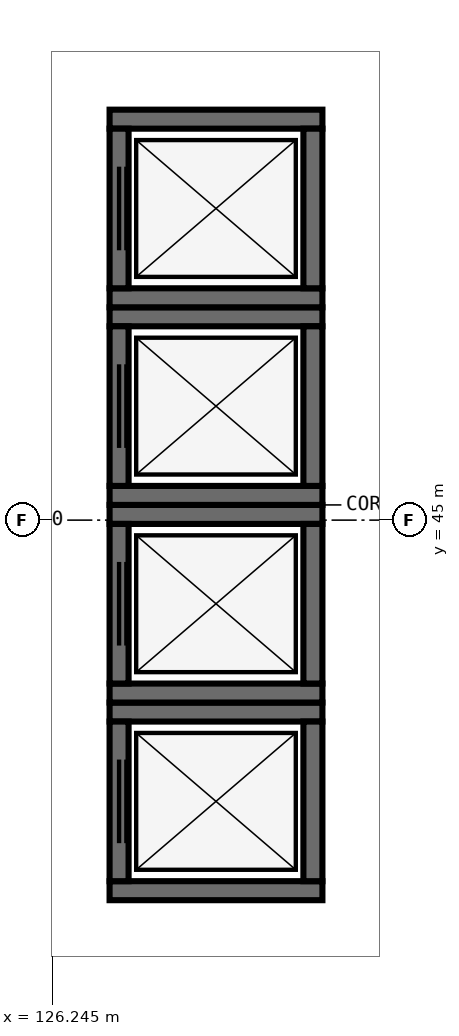
"""IFC4 building model, lengths in metres.
Left out: names, types, materials, properties, quantities, classifications, styles, units other than length and angle.
Written with IfcOpenShell. Run it as: python <this file> out.ifc"""

import sys

from ifc_helpers import new_model, si_unit, direction, frame, frame_2d, origin, place, context, subcontext, project, spatial, rectangle, extrude, element, fill, save


model = new_model("IFC4")
c1 = context("Model", 3, precision=1e-05, world=origin(), true_north=direction((0.0, 1.0)))
c2 = subcontext(c1, "Body", "Model", "MODEL_VIEW")
j1 = project(units=[si_unit("LENGTHUNIT", "METRE"), si_unit("PLANEANGLEUNIT", "RADIAN")], contexts=[c1])
p1 = place(None, origin())
s1 = spatial("IfcSite", under=j1, at=p1, CompositionType="ELEMENT")
p2 = place(p1, origin())
s2 = spatial("IfcBuilding", under=s1, at=p2, CompositionType="ELEMENT")
p3 = place(p2, frame((0.0, 0.0, 12.0)))
s3 = spatial("IfcBuildingStorey", under=s2, at=p3, CompositionType="ELEMENT", Elevation=12.0)
for number, where, z_axis, x_axis in (
    (1, (127.0, 40.125, 0.0), (0.0, 0.0, 1.0), (1.0, 0.0, 0.0)),
    (2, (129.8, 42.475, 0.0), (0.0, 0.0, 1.0), (-1.0, 0.0, 0.0)),
):
    element("IfcWall", number, at=place(p3, frame(where, z_axis=z_axis, x_axis=x_axis)), inside=s3, PredefinedType="SHEAR", context=c2, shape_type="SweptSolid", body=[
        extrude(rectangle(XDim=2.8, YDim=0.25, at=frame_2d((1.4, 0.0))), origin(), (0.0, 0.0, 1.0), 6.0),
    ])
p4 = place(p3, frame((127.125, 42.35, 0.0), z_axis=(0.0, 0.0, 1.0), x_axis=(0.0, -1.0, 0.0)))
e3 = element("IfcWall", 3, at=p4, inside=s3, PredefinedType="SHEAR", context=c2, shape_type="SweptSolid", body=[
    extrude(rectangle(XDim=2.1, YDim=0.25, at=frame_2d((1.05, 0.0))), origin(), (0.0, 0.0, 1.0), 6.0),
])
p5 = place(p4, frame((0.5, 0.0, 0.0)))
e4 = element("IfcOpeningElement", 4, at=p5, cuts=e3, PredefinedType="OPENING", context=c2, shape_type="SweptSolid", body=[
    extrude(rectangle(XDim=1.1, YDim=2.2, at=frame_2d((0.55, 1.1))), frame((0.0, 0.14, 0.0), z_axis=(0.0, -1.0, 0.0), x_axis=(1.0, 0.0, 0.0)), (0.0, 0.0, 1.0), 0.28),
])
p6 = place(p3, frame((129.675, 40.25, 0.0), z_axis=(0.0, 0.0, 1.0), x_axis=(0.0, 1.0, 0.0)))
e5 = element("IfcWall", 5, at=p6, inside=s3, PredefinedType="SHEAR", context=c2, shape_type="SweptSolid", body=[
    extrude(rectangle(XDim=2.1, YDim=0.25, at=frame_2d((1.05, 0.0))), origin(), (0.0, 0.0, 1.0), 6.0),
])
for number, where, z_axis, x_axis in (
    (6, (127.0, 42.725, 0.0), (0.0, 0.0, 1.0), (1.0, 0.0, 0.0)),
    (7, (129.8, 45.075, 0.0), (0.0, 0.0, 1.0), (-1.0, 0.0, 0.0)),
):
    element("IfcWall", number, at=place(p3, frame(where, z_axis=z_axis, x_axis=x_axis)), inside=s3, PredefinedType="SHEAR", context=c2, shape_type="SweptSolid", body=[
        extrude(rectangle(XDim=2.8, YDim=0.25, at=frame_2d((1.4, 0.0))), origin(), (0.0, 0.0, 1.0), 6.0),
    ])
p7 = place(p3, frame((127.125, 44.95, 0.0), z_axis=(0.0, 0.0, 1.0), x_axis=(0.0, -1.0, 0.0)))
e8 = element("IfcWall", 8, at=p7, inside=s3, PredefinedType="SHEAR", context=c2, shape_type="SweptSolid", body=[
    extrude(rectangle(XDim=2.1, YDim=0.25, at=frame_2d((1.05, 0.0))), origin(), (0.0, 0.0, 1.0), 6.0),
])
p8 = place(p7, frame((0.5, 0.0, 0.0)))
e9 = element("IfcOpeningElement", 9, at=p8, cuts=e8, PredefinedType="OPENING", context=c2, shape_type="SweptSolid", body=[
    extrude(rectangle(XDim=1.1, YDim=2.2, at=frame_2d((0.55, 1.1))), frame((0.0, 0.14, 0.0), z_axis=(0.0, -1.0, 0.0), x_axis=(1.0, 0.0, 0.0)), (0.0, 0.0, 1.0), 0.28),
])
p9 = place(p3, frame((129.675, 42.85, 0.0), z_axis=(0.0, 0.0, 1.0), x_axis=(0.0, 1.0, 0.0)))
e10 = element("IfcWall", 10, at=p9, inside=s3, PredefinedType="SHEAR", context=c2, shape_type="SweptSolid", body=[
    extrude(rectangle(XDim=2.1, YDim=0.25, at=frame_2d((1.05, 0.0))), origin(), (0.0, 0.0, 1.0), 6.0),
])
for number, where, z_axis, x_axis in (
    (11, (127.0, 45.325, 0.0), (0.0, 0.0, 1.0), (1.0, 0.0, 0.0)),
    (12, (129.8, 47.675, 0.0), (0.0, 0.0, 1.0), (-1.0, 0.0, 0.0)),
):
    element("IfcWall", number, at=place(p3, frame(where, z_axis=z_axis, x_axis=x_axis)), inside=s3, PredefinedType="SHEAR", context=c2, shape_type="SweptSolid", body=[
        extrude(rectangle(XDim=2.8, YDim=0.25, at=frame_2d((1.4, 0.0))), origin(), (0.0, 0.0, 1.0), 6.0),
    ])
p10 = place(p3, frame((127.125, 47.55, 0.0), z_axis=(0.0, 0.0, 1.0), x_axis=(0.0, -1.0, 0.0)))
e13 = element("IfcWall", 13, at=p10, inside=s3, PredefinedType="SHEAR", context=c2, shape_type="SweptSolid", body=[
    extrude(rectangle(XDim=2.1, YDim=0.25, at=frame_2d((1.05, 0.0))), origin(), (0.0, 0.0, 1.0), 6.0),
])
p11 = place(p10, frame((0.5, 0.0, 0.0)))
e14 = element("IfcOpeningElement", 14, at=p11, cuts=e13, PredefinedType="OPENING", context=c2, shape_type="SweptSolid", body=[
    extrude(rectangle(XDim=1.1, YDim=2.2, at=frame_2d((0.55, 1.1))), frame((0.0, 0.14, 0.0), z_axis=(0.0, -1.0, 0.0), x_axis=(1.0, 0.0, 0.0)), (0.0, 0.0, 1.0), 0.28),
])
p12 = place(p3, frame((129.675, 45.45, 0.0), z_axis=(0.0, 0.0, 1.0), x_axis=(0.0, 1.0, 0.0)))
e15 = element("IfcWall", 15, at=p12, inside=s3, PredefinedType="SHEAR", context=c2, shape_type="SweptSolid", body=[
    extrude(rectangle(XDim=2.1, YDim=0.25, at=frame_2d((1.05, 0.0))), origin(), (0.0, 0.0, 1.0), 6.0),
])
for number, where, z_axis, x_axis in (
    (16, (127.0, 47.925, 0.0), (0.0, 0.0, 1.0), (1.0, 0.0, 0.0)),
    (17, (129.8, 50.275, 0.0), (0.0, 0.0, 1.0), (-1.0, 0.0, 0.0)),
):
    element("IfcWall", number, at=place(p3, frame(where, z_axis=z_axis, x_axis=x_axis)), inside=s3, PredefinedType="SHEAR", context=c2, shape_type="SweptSolid", body=[
        extrude(rectangle(XDim=2.8, YDim=0.25, at=frame_2d((1.4, 0.0))), origin(), (0.0, 0.0, 1.0), 6.0),
    ])
p13 = place(p3, frame((127.125, 50.15, 0.0), z_axis=(0.0, 0.0, 1.0), x_axis=(0.0, -1.0, 0.0)))
e18 = element("IfcWall", 18, at=p13, inside=s3, PredefinedType="SHEAR", context=c2, shape_type="SweptSolid", body=[
    extrude(rectangle(XDim=2.1, YDim=0.25, at=frame_2d((1.05, 0.0))), origin(), (0.0, 0.0, 1.0), 6.0),
])
p14 = place(p13, frame((0.5, 0.0, 0.0)))
e19 = element("IfcOpeningElement", 19, at=p14, cuts=e18, PredefinedType="OPENING", context=c2, shape_type="SweptSolid", body=[
    extrude(rectangle(XDim=1.1, YDim=2.2, at=frame_2d((0.55, 1.1))), frame((0.0, 0.14, 0.0), z_axis=(0.0, -1.0, 0.0), x_axis=(1.0, 0.0, 0.0)), (0.0, 0.0, 1.0), 0.28),
])
p15 = place(p3, frame((129.675, 48.05, 0.0), z_axis=(0.0, 0.0, 1.0), x_axis=(0.0, 1.0, 0.0)))
e20 = element("IfcWall", 20, at=p15, inside=s3, PredefinedType="SHEAR", context=c2, shape_type="SweptSolid", body=[
    extrude(rectangle(XDim=2.1, YDim=0.25, at=frame_2d((1.05, 0.0))), origin(), (0.0, 0.0, 1.0), 6.0),
])
p16 = place(p5, origin())
e21 = element("IfcDoor", 21, at=p16, inside=s3, OperationType="DOUBLE_DOOR_SLIDING", PredefinedType="DOOR", context=c2, shape_type="SweptSolid", body=[
    extrude(rectangle(XDim=1.1, YDim=2.2, at=frame_2d((0.55, 1.1))), frame((0.0, 0.025, 0.0), z_axis=(0.0, -1.0, 0.0), x_axis=(1.0, 0.0, 0.0)), (0.0, 0.0, 1.0), 0.05),
])
fill(e4, e21)
p17 = place(p8, origin())
e22 = element("IfcDoor", 22, at=p17, inside=s3, OperationType="DOUBLE_DOOR_SLIDING", PredefinedType="DOOR", context=c2, shape_type="SweptSolid", body=[
    extrude(rectangle(XDim=1.1, YDim=2.2, at=frame_2d((0.55, 1.1))), frame((0.0, 0.025, 0.0), z_axis=(0.0, -1.0, 0.0), x_axis=(1.0, 0.0, 0.0)), (0.0, 0.0, 1.0), 0.05),
])
fill(e9, e22)
p18 = place(p11, origin())
e23 = element("IfcDoor", 23, at=p18, inside=s3, OperationType="DOUBLE_DOOR_SLIDING", PredefinedType="DOOR", context=c2, shape_type="SweptSolid", body=[
    extrude(rectangle(XDim=1.1, YDim=2.2, at=frame_2d((0.55, 1.1))), frame((0.0, 0.025, 0.0), z_axis=(0.0, -1.0, 0.0), x_axis=(1.0, 0.0, 0.0)), (0.0, 0.0, 1.0), 0.05),
])
fill(e14, e23)
p19 = place(p14, origin())
e24 = element("IfcDoor", 24, at=p19, inside=s3, OperationType="DOUBLE_DOOR_SLIDING", PredefinedType="DOOR", context=c2, shape_type="SweptSolid", body=[
    extrude(rectangle(XDim=1.1, YDim=2.2, at=frame_2d((0.55, 1.1))), frame((0.0, 0.025, 0.0), z_axis=(0.0, -1.0, 0.0), x_axis=(1.0, 0.0, 0.0)), (0.0, 0.0, 1.0), 0.05),
])
fill(e19, e24)
save(model, sys.argv[1])
